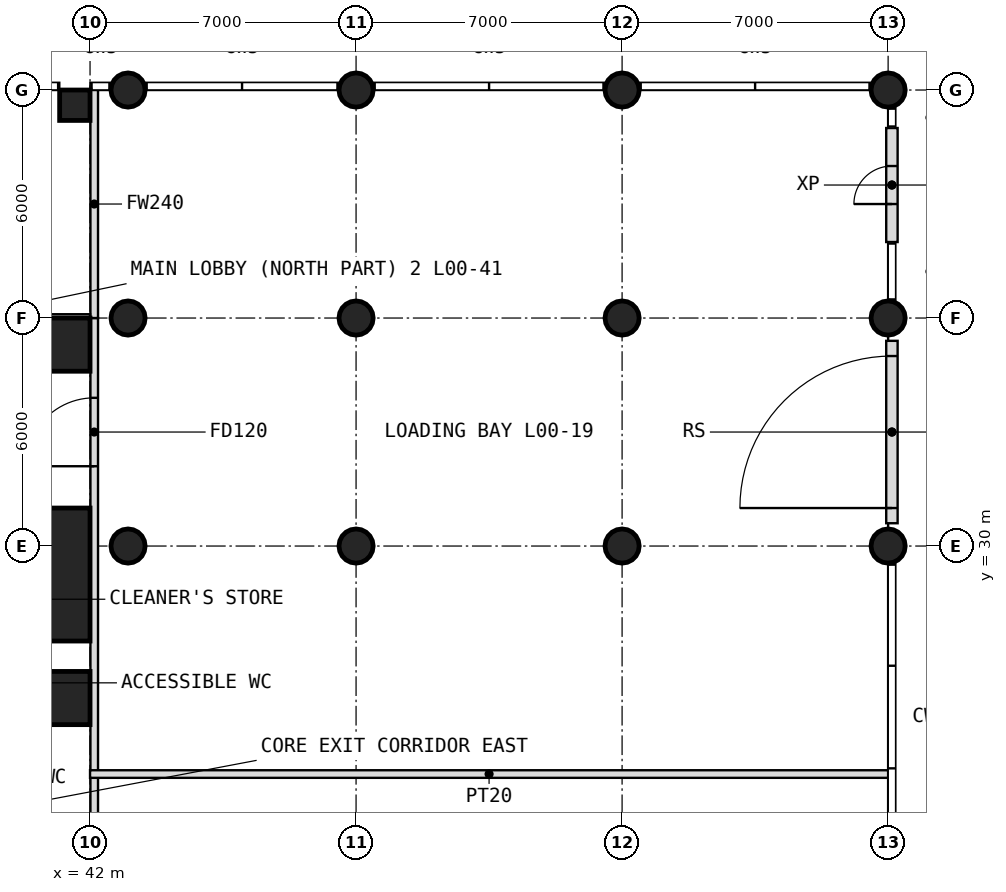
"""IFC4 building model, lengths in metres.
Left out: names, types, materials, properties, quantities, classifications, styles, units other than length and angle.
Written with IfcOpenShell. Run it as: python <this file> out.ifc"""

import sys

from ifc_helpers import new_model, si_unit, direction, frame, frame_2d, origin, origin_2d, place, context, subcontext, project, spatial, rectangle, circle, extrude, element, fill, save


model = new_model("IFC4")
c1 = context("Model", 3, precision=1e-05, world=origin(), true_north=direction((0.0, 1.0)))
c2 = subcontext(c1, "Body", "Model", "MODEL_VIEW")
j1 = project(units=[si_unit("LENGTHUNIT", "METRE"), si_unit("PLANEANGLEUNIT", "RADIAN")], contexts=[c1])
p1 = place(None, origin())
s1 = spatial("IfcSite", under=j1, at=p1, CompositionType="ELEMENT")
p2 = place(p1, origin())
s2 = spatial("IfcBuilding", under=s1, at=p2, CompositionType="ELEMENT")
p3 = place(p2, origin())
s3 = spatial("IfcBuildingStorey", under=s2, at=p3, CompositionType="ELEMENT", Elevation=0.0)
p4 = place(p3, frame((41.3, 26.0, -0.4), z_axis=(0.0, 0.0, 1.0), x_axis=(1.0, 0.0, 0.0)))
e1 = element("IfcColumn", 1, at=p4, inside=s3, PredefinedType="COLUMN", context=c2, shape_type="SweptSolid", body=[
    extrude(rectangle(XDim=1.4, YDim=1.4, at=origin_2d()), origin(), (0.0, 0.0, 1.0), 6.4),
])
for number, where, z_axis, x_axis in (
    (2, (43.0, 30.0, -0.4), (0.0, 0.0, 1.0), (1.0, 0.0, 0.0)),
    (3, (49.0, 30.0, -0.4), (0.0, 0.0, 1.0), (1.0, 0.0, 0.0)),
    (4, (56.0, 30.0, -0.4), (0.0, 0.0, 1.0), (1.0, 0.0, 0.0)),
    (5, (63.0, 30.0, -0.4), (0.0, 0.0, 1.0), (1.0, 0.0, 0.0)),
):
    element("IfcColumn", number, at=place(p3, frame(where, z_axis=z_axis, x_axis=x_axis)), inside=s3, PredefinedType="COLUMN", context=c2, shape_type="SweptSolid", body=[
        extrude(circle(Radius=0.45, at=origin_2d()), origin(), (0.0, 0.0, 1.0), 6.4),
    ])
p5 = place(p3, frame((40.25, 29.25, -0.4), z_axis=(0.0, 0.0, 1.0), x_axis=(1.0, 0.0, 0.0)))
e6 = element("IfcColumn", 6, at=p5, inside=s3, PredefinedType="COLUMN", context=c2, shape_type="SweptSolid", body=[
    extrude(rectangle(XDim=3.5, YDim=3.5, at=origin_2d()), origin(), (0.0, 0.0, 1.0), 6.4),
])
p6 = place(p3, frame((41.3, 35.3, -0.4), z_axis=(0.0, 0.0, 1.0), x_axis=(1.0, 0.0, 0.0)))
e7 = element("IfcColumn", 7, at=p6, inside=s3, PredefinedType="COLUMN", context=c2, shape_type="SweptSolid", body=[
    extrude(rectangle(XDim=1.4, YDim=1.4, at=origin_2d()), origin(), (0.0, 0.0, 1.0), 6.4),
])
for number, where, z_axis, x_axis in (
    (8, (43.0, 36.0, -0.4), (0.0, 0.0, 1.0), (1.0, 0.0, 0.0)),
    (9, (49.0, 36.0, -0.4), (0.0, 0.0, 1.0), (1.0, 0.0, 0.0)),
    (10, (56.0, 36.0, -0.4), (0.0, 0.0, 1.0), (1.0, 0.0, 0.0)),
    (11, (63.0, 36.0, -0.4), (0.0, 0.0, 1.0), (1.0, 0.0, 0.0)),
):
    element("IfcColumn", number, at=place(p3, frame(where, z_axis=z_axis, x_axis=x_axis)), inside=s3, PredefinedType="COLUMN", context=c2, shape_type="SweptSolid", body=[
        extrude(circle(Radius=0.45, at=origin_2d()), origin(), (0.0, 0.0, 1.0), 6.4),
    ])
p7 = place(p3, frame((41.6, 41.6, -0.4), z_axis=(0.0, 0.0, 1.0), x_axis=(1.0, 0.0, 0.0)))
e12 = element("IfcColumn", 12, at=p7, inside=s3, PredefinedType="COLUMN", context=c2, shape_type="SweptSolid", body=[
    extrude(rectangle(XDim=0.8, YDim=0.8, at=origin_2d()), origin(), (0.0, 0.0, 1.0), 6.4),
])
for number, where, z_axis, x_axis in (
    (13, (43.0, 42.0, -0.4), (0.0, 0.0, 1.0), (1.0, 0.0, 0.0)),
    (14, (49.0, 42.0, -0.4), (0.0, 0.0, 1.0), (1.0, 0.0, 0.0)),
    (15, (56.0, 42.0, -0.4), (0.0, 0.0, 1.0), (1.0, 0.0, 0.0)),
    (16, (63.0, 42.0, -0.4), (0.0, 0.0, 1.0), (1.0, 0.0, 0.0)),
):
    element("IfcColumn", number, at=place(p3, frame(where, z_axis=z_axis, x_axis=x_axis)), inside=s3, PredefinedType="COLUMN", context=c2, shape_type="SweptSolid", body=[
        extrude(circle(Radius=0.45, at=origin_2d()), origin(), (0.0, 0.0, 1.0), 6.4),
    ])
p8 = place(p3, frame((63.1, 30.6, 0.0), z_axis=(0.0, 0.0, 1.0), x_axis=(0.0, 1.0, 0.0)))
e17 = element("IfcWall", 17, at=p8, inside=s3, PredefinedType="USERDEFINED", context=c2, shape_type="SweptSolid", body=[
    extrude(rectangle(XDim=4.8, YDim=0.3, at=frame_2d((2.4, 0.0))), origin(), (0.0, 0.0, 1.0), 4.6),
])
p9 = place(p8, frame((0.4, 0.0, 0.0)))
e18 = element("IfcOpeningElement", 18, at=p9, cuts=e17, PredefinedType="OPENING", context=c2, shape_type="SweptSolid", body=[
    extrude(rectangle(XDim=4.0, YDim=4.5, at=frame_2d((2.0, 2.25))), frame((0.0, 0.16, 0.0), z_axis=(0.0, -1.0, 0.0), x_axis=(1.0, 0.0, 0.0)), (0.0, 0.0, 1.0), 0.32),
])
p10 = place(p3, frame((63.1, 38.0, 0.0), z_axis=(0.0, 0.0, 1.0), x_axis=(0.0, 1.0, 0.0)))
e19 = element("IfcWall", 19, at=p10, inside=s3, PredefinedType="USERDEFINED", context=c2, shape_type="SweptSolid", body=[
    extrude(rectangle(XDim=3.0, YDim=0.3, at=frame_2d((1.5, 0.0))), origin(), (0.0, 0.0, 1.0), 4.6),
])
p11 = place(p10, frame((1.0, 0.0, 0.0)))
e20 = element("IfcOpeningElement", 20, at=p11, cuts=e19, PredefinedType="OPENING", context=c2, shape_type="SweptSolid", body=[
    extrude(rectangle(XDim=1.0, YDim=2.1, at=frame_2d((0.5, 1.05))), frame((0.0, 0.16, 0.0), z_axis=(0.0, -1.0, 0.0), x_axis=(1.0, 0.0, 0.0)), (0.0, 0.0, 1.0), 0.32),
])
p12 = place(p3, frame((42.11, 6.0, 0.0), z_axis=(0.0, 0.0, 1.0), x_axis=(0.0, 1.0, 0.0)))
e21 = element("IfcWall", 21, at=p12, inside=s3, PredefinedType="PARTITIONING", context=c2, shape_type="SweptSolid", body=[
    extrude(rectangle(XDim=30.0, YDim=0.2, at=frame_2d((15.0, 0.0))), origin(), (0.0, 0.0, 1.0), 5.6),
])
p13 = place(p12, frame((11.3, 0.0, 0.0)))
e22 = element("IfcOpeningElement", 22, at=p13, cuts=e21, PredefinedType="OPENING", context=c2, shape_type="SweptSolid", body=[
    extrude(rectangle(XDim=1.8, YDim=2.4, at=frame_2d((0.9, 1.2))), frame((0.0, 0.11, 0.0), z_axis=(0.0, -1.0, 0.0), x_axis=(1.0, 0.0, 0.0)), (0.0, 0.0, 1.0), 0.22),
])
p14 = place(p12, frame((26.1, 0.0, 0.0)))
e23 = element("IfcOpeningElement", 23, at=p14, cuts=e21, PredefinedType="OPENING", context=c2, shape_type="SweptSolid", body=[
    extrude(rectangle(XDim=1.8, YDim=2.4, at=frame_2d((0.9, 1.2))), frame((0.0, 0.11, 0.0), z_axis=(0.0, -1.0, 0.0), x_axis=(1.0, 0.0, 0.0)), (0.0, 0.0, 1.0), 0.22),
])
p15 = place(p3, frame((42.11, 36.0, 0.0), z_axis=(0.0, 0.0, 1.0), x_axis=(0.0, 1.0, 0.0)))
e24 = element("IfcWall", 24, at=p15, inside=s3, PredefinedType="PARTITIONING", context=c2, shape_type="SweptSolid", body=[
    extrude(rectangle(XDim=6.0, YDim=0.2, at=frame_2d((3.0, 0.0))), origin(), (0.0, 0.0, 1.0), 4.98),
])
p16 = place(p3, frame((33.0, 36.0, 0.0), z_axis=(0.0, 0.0, 1.0), x_axis=(1.0, 0.0, 0.0)))
e25 = element("IfcWall", 25, at=p16, inside=s3, PredefinedType="PARTITIONING", context=c2, shape_type="SweptSolid", body=[
    extrude(rectangle(XDim=9.0, YDim=0.2, at=frame_2d((4.5, 0.0))), origin(), (0.0, 0.0, 1.0), 5.6),
])
p17 = place(p16, frame((4.0, 0.0, 0.0)))
e26 = element("IfcOpeningElement", 26, at=p17, cuts=e25, PredefinedType="OPENING", context=c2, shape_type="SweptSolid", body=[
    extrude(rectangle(XDim=1.0, YDim=2.2, at=frame_2d((0.5, 1.1))), frame((0.0, 0.11, 0.0), z_axis=(0.0, -1.0, 0.0), x_axis=(1.0, 0.0, 0.0)), (0.0, 0.0, 1.0), 0.22),
])
p18 = place(p3, frame((42.0, 24.0, 0.0), z_axis=(0.0, 0.0, 1.0), x_axis=(1.0, 0.0, 0.0)))
e27 = element("IfcWall", 27, at=p18, inside=s3, PredefinedType="PARTITIONING", context=c2, shape_type="SweptSolid", body=[
    extrude(rectangle(XDim=21.0, YDim=0.2, at=frame_2d((10.5, 0.0))), origin(), (0.0, 0.0, 1.0), 5.6),
])
p19 = place(p9, origin())
e28 = element("IfcDoor", 28, at=p19, inside=s3, OperationType="ROLLINGUP", PredefinedType="GATE", context=c2, shape_type="SweptSolid", body=[
    extrude(rectangle(XDim=4.0, YDim=4.5, at=frame_2d((2.0, 2.25))), frame((0.0, 0.025, 0.0), z_axis=(0.0, -1.0, 0.0), x_axis=(1.0, 0.0, 0.0)), (0.0, 0.0, 1.0), 0.05),
])
fill(e18, e28)
p20 = place(p11, origin())
e29 = element("IfcDoor", 29, at=p20, inside=s3, OperationType="SINGLE_SWING_LEFT", PredefinedType="DOOR", context=c2, shape_type="SweptSolid", body=[
    extrude(rectangle(XDim=1.0, YDim=2.1, at=frame_2d((0.5, 1.05))), frame((0.0, 0.025, 0.0), z_axis=(0.0, -1.0, 0.0), x_axis=(1.0, 0.0, 0.0)), (0.0, 0.0, 1.0), 0.05),
])
fill(e20, e29)
p21 = place(p14, origin())
e30 = element("IfcDoor", 30, at=p21, inside=s3, OperationType="DOUBLE_DOOR_SINGLE_SWING", PredefinedType="DOOR", context=c2, shape_type="SweptSolid", body=[
    extrude(rectangle(XDim=1.8, YDim=2.4, at=frame_2d((0.9, 1.2))), frame((0.0, 0.025, 0.0), z_axis=(0.0, -1.0, 0.0), x_axis=(1.0, 0.0, 0.0)), (0.0, 0.0, 1.0), 0.05),
])
fill(e23, e30)
save(model, sys.argv[1])
